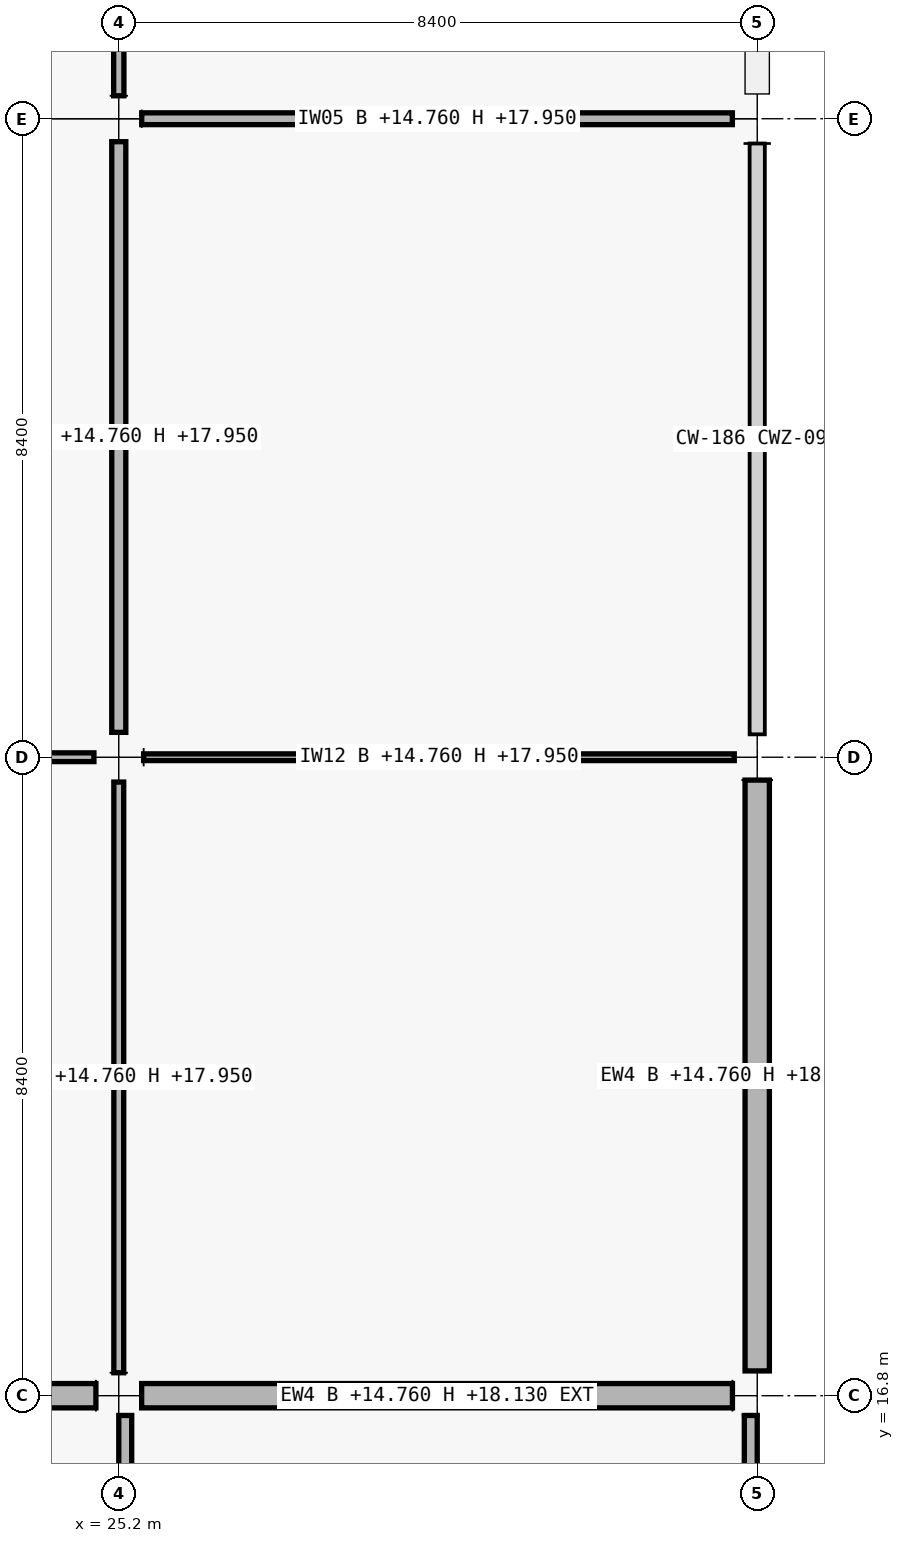
"""IFC4 building model, lengths in metres.
Left out: names, types, materials, properties, quantities, classifications, styles, units other than length and angle.
Written with IfcOpenShell. Run it as: python <this file> out.ifc"""

import sys

from ifc_helpers import new_model, si_unit, direction, frame, frame_2d, origin, origin_2d, place, context, subcontext, project, spatial, rectangle, extrude, element, fill, save


model = new_model("IFC4")
c1 = context("Model", 3, precision=1e-05, world=origin(), true_north=direction((0.0, 1.0)))
c2 = subcontext(c1, "Body", "Model", "MODEL_VIEW")
j1 = project(units=[si_unit("LENGTHUNIT", "METRE"), si_unit("PLANEANGLEUNIT", "RADIAN")], contexts=[c1])
p1 = place(None, origin())
s1 = spatial("IfcSite", under=j1, at=p1, CompositionType="ELEMENT")
p2 = place(p1, origin())
s2 = spatial("IfcBuilding", under=s1, at=p2, CompositionType="ELEMENT")
p3 = place(p2, frame((0.0, 0.0, 14.76)))
s3 = spatial("IfcBuildingStorey", under=s2, at=p3, CompositionType="ELEMENT", Elevation=14.76)
p4 = place(p3, frame((25.2, 16.8, 0.0), z_axis=(0.0, 0.0, 1.0), x_axis=(1.0, 0.0, 0.0)))
e1 = element("IfcColumn", 1, at=p4, inside=s3, PredefinedType="COLUMN", context=c2, shape_type="SweptSolid", body=[
    extrude(rectangle(XDim=0.6, YDim=0.6, at=origin_2d()), origin(), (0.0, 0.0, 1.0), 4.32),
])
p5 = place(p3, frame((25.2, 25.2, 0.0), z_axis=(0.0, 0.0, 1.0), x_axis=(1.0, 0.0, 0.0)))
e2 = element("IfcColumn", 2, at=p5, inside=s3, PredefinedType="COLUMN", context=c2, shape_type="SweptSolid", body=[
    extrude(rectangle(XDim=0.65, YDim=0.65, at=origin_2d()), origin(), (0.0, 0.0, 1.0), 4.32),
])
p6 = place(p3, frame((25.2, 33.6, 0.0), z_axis=(0.0, 0.0, 1.0), x_axis=(1.0, 0.0, 0.0)))
e3 = element("IfcColumn", 3, at=p6, inside=s3, PredefinedType="COLUMN", context=c2, shape_type="SweptSolid", body=[
    extrude(rectangle(XDim=0.6, YDim=0.6, at=origin_2d()), origin(), (0.0, 0.0, 1.0), 4.32),
])
p7 = place(p3, frame((33.6, 16.8, 0.0), z_axis=(0.0, 0.0, 1.0), x_axis=(1.0, 0.0, 0.0)))
e4 = element("IfcColumn", 4, at=p7, inside=s3, PredefinedType="COLUMN", context=c2, shape_type="SweptSolid", body=[
    extrude(rectangle(XDim=0.65, YDim=0.65, at=origin_2d()), origin(), (0.0, 0.0, 1.0), 4.32),
])
p8 = place(p3, frame((33.6, 25.2, 0.0), z_axis=(0.0, 0.0, 1.0), x_axis=(1.0, 0.0, 0.0)))
e5 = element("IfcColumn", 5, at=p8, inside=s3, PredefinedType="COLUMN", context=c2, shape_type="SweptSolid", body=[
    extrude(rectangle(XDim=0.6, YDim=0.6, at=origin_2d()), origin(), (0.0, 0.0, 1.0), 4.32),
])
p9 = place(p3, frame((33.6, 33.6, 0.0), z_axis=(0.0, 0.0, 1.0), x_axis=(1.0, 0.0, 0.0)))
e6 = element("IfcColumn", 6, at=p9, inside=s3, PredefinedType="COLUMN", context=c2, shape_type="SweptSolid", body=[
    extrude(rectangle(XDim=0.65, YDim=0.65, at=origin_2d()), origin(), (0.0, 0.0, 1.0), 4.32),
])
p10 = place(p3, frame((24.899, 16.8, 0.0), z_axis=(0.0, 0.0, 1.0), x_axis=(-1.0, 0.0, 0.0)))
e7 = element("IfcWall", 7, at=p10, inside=s3, PredefinedType="SOLIDWALL", context=c2, shape_type="SweptSolid", body=[
    extrude(rectangle(XDim=7.773, YDim=0.32, at=frame_2d((3.886, 0.0))), origin(), (0.0, 0.0, 1.0), 3.37),
])
p11 = place(p10, frame((3.061, 0.0, 0.0)))
e8 = element("IfcOpeningElement", 8, at=p11, cuts=e7, PredefinedType="OPENING", context=c2, shape_type="SweptSolid", body=[
    extrude(rectangle(XDim=1.65, YDim=2.2, at=frame_2d((0.825, 1.1))), frame((0.0, 0.16, 0.0), z_axis=(0.0, -1.0, 0.0), x_axis=(1.0, 0.0, 0.0)), (0.0, 0.0, 1.0), 0.32),
])
p12 = place(p3, frame((33.274, 16.8, 0.0), z_axis=(0.0, 0.0, 1.0), x_axis=(-1.0, 0.0, 0.0)))
e9 = element("IfcWall", 9, at=p12, inside=s3, PredefinedType="SOLIDWALL", context=c2, shape_type="SweptSolid", body=[
    extrude(rectangle(XDim=7.773, YDim=0.32, at=frame_2d((3.886, 0.0))), origin(), (0.0, 0.0, 1.0), 3.37),
])
p13 = place(p12, frame((2.786, 0.0, 0.9)))
e10 = element("IfcOpeningElement", 10, at=p13, cuts=e9, PredefinedType="OPENING", context=c2, shape_type="SweptSolid", body=[
    extrude(rectangle(XDim=2.2, YDim=1.75, at=frame_2d((1.1, 0.875))), frame((0.0, 0.16, 0.0), z_axis=(0.0, -1.0, 0.0), x_axis=(1.0, 0.0, 0.0)), (0.0, 0.0, 1.0), 0.32),
])
p14 = place(p3, frame((33.6, 24.899, 0.0), z_axis=(0.0, 0.0, 1.0), x_axis=(0.0, -1.0, 0.0)))
e11 = element("IfcWall", 11, at=p14, inside=s3, PredefinedType="SOLIDWALL", context=c2, shape_type="SweptSolid", body=[
    extrude(rectangle(XDim=7.773, YDim=0.32, at=frame_2d((3.886, 0.0))), origin(), (0.0, 0.0, 1.0), 3.37),
])
p15 = place(p14, frame((2.486, 0.0, 0.9)))
e12 = element("IfcOpeningElement", 12, at=p15, cuts=e11, PredefinedType="OPENING", context=c2, shape_type="SweptSolid", body=[
    extrude(rectangle(XDim=2.8, YDim=1.75, at=frame_2d((1.4, 0.875))), frame((0.0, 0.16, 0.0), z_axis=(0.0, -1.0, 0.0), x_axis=(1.0, 0.0, 0.0)), (0.0, 0.0, 1.0), 0.32),
])
p16 = place(p3, frame((33.6, 41.699, 0.0), z_axis=(0.0, 0.0, 1.0), x_axis=(0.0, -1.0, 0.0)))
e13 = element("IfcWall", 13, at=p16, inside=s3, PredefinedType="SOLIDWALL", context=c2, shape_type="SweptSolid", body=[
    extrude(rectangle(XDim=7.773, YDim=0.32, at=frame_2d((3.886, 0.0))), origin(), (0.0, 0.0, 1.0), 3.37),
])
p17 = place(p16, frame((2.936, 0.0, 0.9)))
e14 = element("IfcOpeningElement", 14, at=p17, cuts=e13, PredefinedType="OPENING", context=c2, shape_type="SweptSolid", body=[
    extrude(rectangle(XDim=1.9, YDim=1.75, at=frame_2d((0.95, 0.875))), frame((0.0, 0.16, 0.0), z_axis=(0.0, -1.0, 0.0), x_axis=(1.0, 0.0, 0.0)), (0.0, 0.0, 1.0), 0.32),
])
for number, where, z_axis, x_axis in (
    (15, (25.285, 8.66, 0.0), (0.0, 0.0, 1.0), (0.0, 1.0, 0.0)),
    (16, (33.515, 16.54, 0.0), (0.0, 0.0, 1.0), (0.0, -1.0, 0.0)),
):
    element("IfcWall", number, at=place(p3, frame(where, z_axis=z_axis, x_axis=x_axis)), inside=s3, PredefinedType="PARAPET", context=c2, shape_type="SweptSolid", body=[
        extrude(rectangle(XDim=7.88, YDim=0.17, at=frame_2d((3.94, 0.0))), origin(), (0.0, 0.0, 1.0), 0.95),
    ])
p18 = place(p3, frame((17.102, 25.2, 0.0), z_axis=(0.0, 0.0, 1.0), x_axis=(1.0, 0.0, 0.0)))
e17 = element("IfcWall", 17, at=p18, inside=s3, PredefinedType="PARTITIONING", context=c2, shape_type="SweptSolid", body=[
    extrude(rectangle(XDim=7.771, YDim=0.115, at=frame_2d((3.885, 0.0))), origin(), (0.0, 0.0, 1.0), 3.19),
])
p19 = place(p18, frame((3.345, 0.0, 0.0)))
e18 = element("IfcOpeningElement", 18, at=p19, cuts=e17, PredefinedType="OPENING", context=c2, shape_type="SweptSolid", body=[
    extrude(rectangle(XDim=1.08, YDim=2.25, at=frame_2d((0.54, 1.125))), frame((0.0, 0.058, 0.0), z_axis=(0.0, -1.0, 0.0), x_axis=(1.0, 0.0, 0.0)), (0.0, 0.0, 1.0), 0.115),
])
p20 = place(p3, frame((25.527, 25.2, 0.0), z_axis=(0.0, 0.0, 1.0), x_axis=(1.0, 0.0, 0.0)))
e19 = element("IfcWall", 19, at=p20, inside=s3, PredefinedType="PARTITIONING", context=c2, shape_type="SweptSolid", body=[
    extrude(rectangle(XDim=7.771, YDim=0.088, at=frame_2d((3.885, 0.0))), origin(), (0.0, 0.0, 1.0), 3.19),
])
p21 = place(p20, frame((3.361, 0.0, 0.0)))
e20 = element("IfcOpeningElement", 20, at=p21, cuts=e19, PredefinedType="OPENING", context=c2, shape_type="SweptSolid", body=[
    extrude(rectangle(XDim=1.05, YDim=2.12, at=frame_2d((0.525, 1.06))), frame((0.0, 0.044, 0.0), z_axis=(0.0, -1.0, 0.0), x_axis=(1.0, 0.0, 0.0)), (0.0, 0.0, 1.0), 0.088),
])
p22 = place(p3, frame((25.502, 33.6, 0.0), z_axis=(0.0, 0.0, 1.0), x_axis=(1.0, 0.0, 0.0)))
e21 = element("IfcWall", 21, at=p22, inside=s3, PredefinedType="PARTITIONING", context=c2, shape_type="SweptSolid", body=[
    extrude(rectangle(XDim=7.771, YDim=0.155, at=frame_2d((3.885, 0.0))), origin(), (0.0, 0.0, 1.0), 3.19),
])
p23 = place(p22, frame((3.361, 0.0, 0.0)))
e22 = element("IfcOpeningElement", 22, at=p23, cuts=e21, PredefinedType="OPENING", context=c2, shape_type="SweptSolid", body=[
    extrude(rectangle(XDim=1.05, YDim=2.12, at=frame_2d((0.525, 1.06))), frame((0.0, 0.078, 0.0), z_axis=(0.0, -1.0, 0.0), x_axis=(1.0, 0.0, 0.0)), (0.0, 0.0, 1.0), 0.155),
])
p24 = place(p3, frame((25.2, 17.102, 0.0), z_axis=(0.0, 0.0, 1.0), x_axis=(0.0, 1.0, 0.0)))
e23 = element("IfcWall", 23, at=p24, inside=s3, PredefinedType="MOVABLE", context=c2, shape_type="SweptSolid", body=[
    extrude(rectangle(XDim=7.771, YDim=0.13, at=frame_2d((3.885, 0.0))), origin(), (0.0, 0.0, 1.0), 3.19),
])
p25 = place(p24, frame((3.345, 0.0, 0.0)))
e24 = element("IfcOpeningElement", 24, at=p25, cuts=e23, PredefinedType="OPENING", context=c2, shape_type="SweptSolid", body=[
    extrude(rectangle(XDim=1.08, YDim=2.25, at=frame_2d((0.54, 1.125))), frame((0.0, 0.065, 0.0), z_axis=(0.0, -1.0, 0.0), x_axis=(1.0, 0.0, 0.0)), (0.0, 0.0, 1.0), 0.13),
])
p26 = place(p3, frame((25.2, 25.527, 0.0), z_axis=(0.0, 0.0, 1.0), x_axis=(0.0, 1.0, 0.0)))
e25 = element("IfcWall", 25, at=p26, inside=s3, PredefinedType="PARTITIONING", context=c2, shape_type="SweptSolid", body=[
    extrude(rectangle(XDim=7.771, YDim=0.185, at=frame_2d((3.885, 0.0))), origin(), (0.0, 0.0, 1.0), 3.19),
])
p27 = place(p26, frame((3.365, 0.0, 0.0)))
e26 = element("IfcOpeningElement", 26, at=p27, cuts=e25, PredefinedType="OPENING", context=c2, shape_type="SweptSolid", body=[
    extrude(rectangle(XDim=1.04, YDim=2.2, at=frame_2d((0.52, 1.1))), frame((0.0, 0.093, 0.0), z_axis=(0.0, -1.0, 0.0), x_axis=(1.0, 0.0, 0.0)), (0.0, 0.0, 1.0), 0.185),
])
p28 = place(p3, frame((25.2, 33.902, 0.0), z_axis=(0.0, 0.0, 1.0), x_axis=(0.0, 1.0, 0.0)))
e27 = element("IfcWall", 27, at=p28, inside=s3, PredefinedType="PARTITIONING", context=c2, shape_type="SweptSolid", body=[
    extrude(rectangle(XDim=7.771, YDim=0.135, at=frame_2d((3.885, 0.0))), origin(), (0.0, 0.0, 1.0), 3.19),
])
p29 = place(p28, frame((3.375, 0.0, 0.0)))
e28 = element("IfcOpeningElement", 28, at=p29, cuts=e27, PredefinedType="OPENING", context=c2, shape_type="SweptSolid", body=[
    extrude(rectangle(XDim=1.02, YDim=2.2, at=frame_2d((0.51, 1.1))), frame((0.0, 0.067, 0.0), z_axis=(0.0, -1.0, 0.0), x_axis=(1.0, 0.0, 0.0)), (0.0, 0.0, 1.0), 0.135),
])
p30 = place(p13, origin())
e29 = element("IfcWindow", 29, at=p30, inside=s3, PartitioningType="SINGLE_PANEL", PredefinedType="WINDOW", context=c2, shape_type="SweptSolid", body=[
    extrude(rectangle(XDim=2.2, YDim=1.75, at=frame_2d((1.1, 0.875))), frame((0.0, 0.03, 0.0), z_axis=(0.0, -1.0, 0.0), x_axis=(1.0, 0.0, 0.0)), (0.0, 0.0, 1.0), 0.06),
])
fill(e10, e29)
p31 = place(p15, origin())
e30 = element("IfcWindow", 30, at=p31, inside=s3, PartitioningType="SINGLE_PANEL", PredefinedType="WINDOW", context=c2, shape_type="SweptSolid", body=[
    extrude(rectangle(XDim=2.8, YDim=1.75, at=frame_2d((1.4, 0.875))), frame((0.0, 0.03, 0.0), z_axis=(0.0, -1.0, 0.0), x_axis=(1.0, 0.0, 0.0)), (0.0, 0.0, 1.0), 0.06),
])
fill(e12, e30)
p32 = place(p27, origin())
e31 = element("IfcDoor", 31, at=p32, inside=s3, OperationType="SINGLE_SWING_LEFT", PredefinedType="DOOR", context=c2, shape_type="SweptSolid", body=[
    extrude(rectangle(XDim=1.04, YDim=2.2, at=frame_2d((0.52, 1.1))), frame((0.0, 0.025, 0.0), z_axis=(0.0, -1.0, 0.0), x_axis=(1.0, 0.0, 0.0)), (0.0, 0.0, 1.0), 0.05),
])
fill(e26, e31)
p33 = place(p21, origin())
e32 = element("IfcDoor", 32, at=p33, inside=s3, OperationType="SINGLE_SWING_RIGHT", PredefinedType="DOOR", context=c2, shape_type="SweptSolid", body=[
    extrude(rectangle(XDim=1.05, YDim=2.12, at=frame_2d((0.525, 1.06))), frame((0.0, 0.025, 0.0), z_axis=(0.0, -1.0, 0.0), x_axis=(1.0, 0.0, 0.0)), (0.0, 0.0, 1.0), 0.05),
])
fill(e20, e32)
p34 = place(p23, origin())
e33 = element("IfcDoor", 33, at=p34, inside=s3, OperationType="SINGLE_SWING_LEFT", PredefinedType="DOOR", context=c2, shape_type="SweptSolid", body=[
    extrude(rectangle(XDim=1.05, YDim=2.12, at=frame_2d((0.525, 1.06))), frame((0.0, 0.025, 0.0), z_axis=(0.0, -1.0, 0.0), x_axis=(1.0, 0.0, 0.0)), (0.0, 0.0, 1.0), 0.05),
])
fill(e22, e33)
p35 = place(p25, origin())
e34 = element("IfcDoor", 34, at=p35, inside=s3, OperationType="SINGLE_SWING_LEFT", PredefinedType="DOOR", context=c2, shape_type="SweptSolid", body=[
    extrude(rectangle(XDim=1.08, YDim=2.25, at=frame_2d((0.54, 1.125))), frame((0.0, 0.025, 0.0), z_axis=(0.0, -1.0, 0.0), x_axis=(1.0, 0.0, 0.0)), (0.0, 0.0, 1.0), 0.05),
])
fill(e24, e34)
save(model, sys.argv[1])
